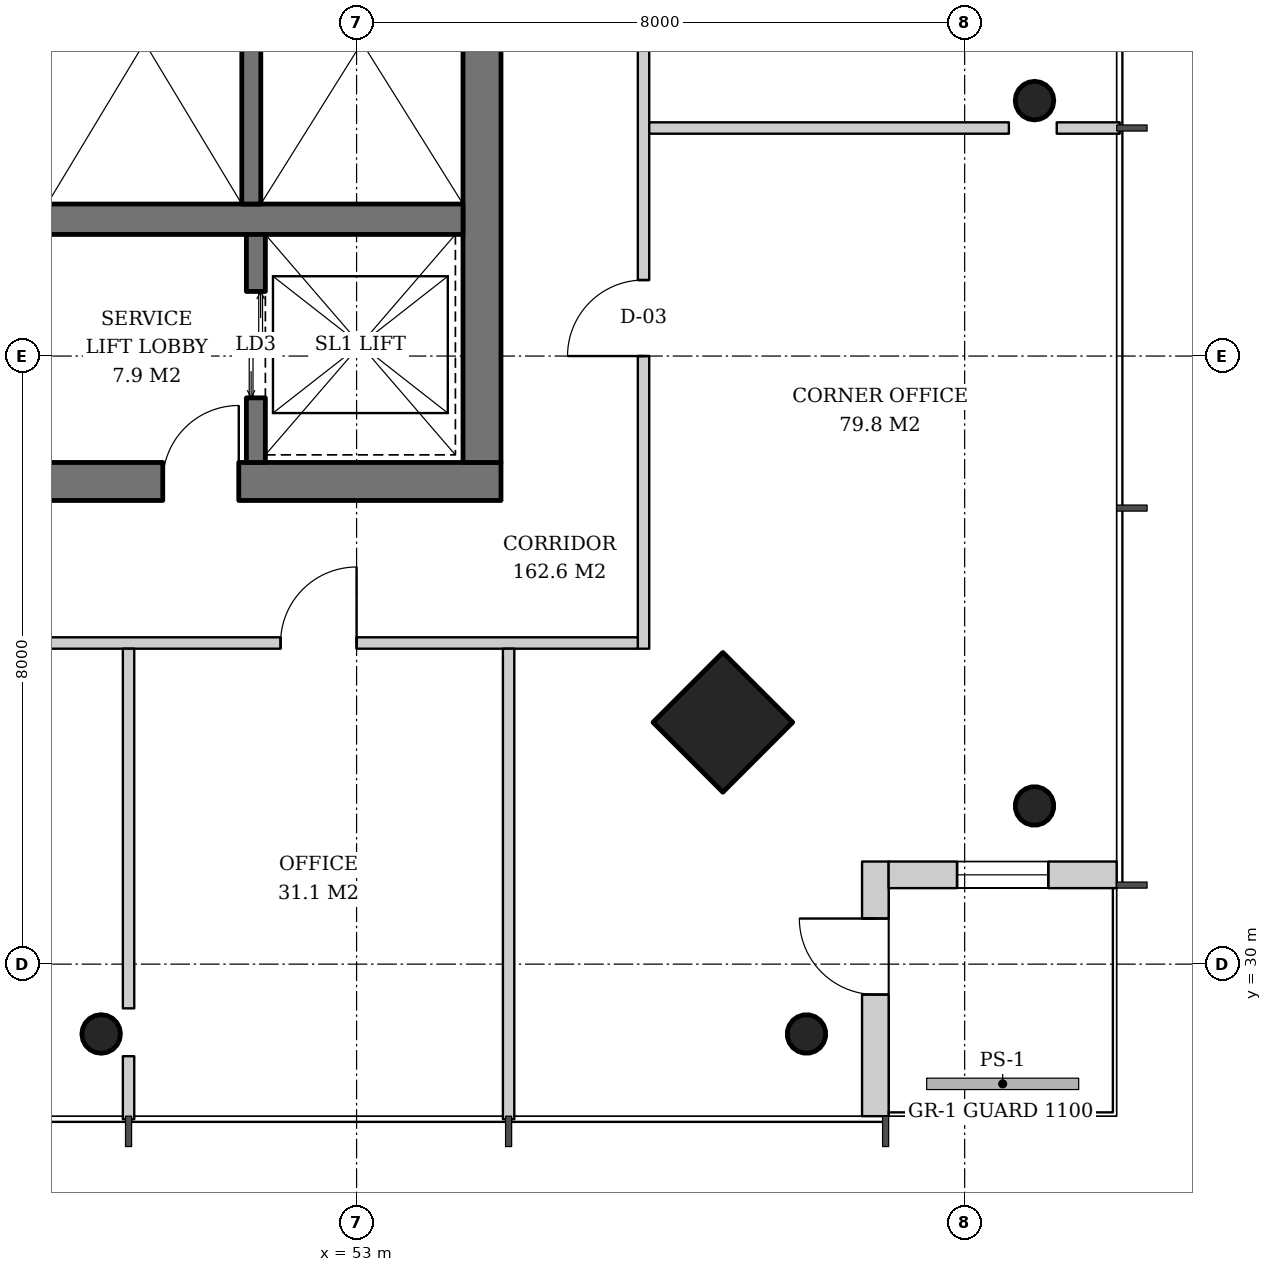
"""IFC4 building model, lengths in metres.
Left out: names, types, materials, properties, quantities, classifications, styles, units other than length and angle.
Written with IfcOpenShell. Run it as: python <this file> out.ifc"""

import sys

from ifc_helpers import new_model, si_unit, direction, frame, frame_2d, origin, origin_2d, place, context, subcontext, project, spatial, rectangle, hollow_circle, extrude, element, fill, save


model = new_model("IFC4")
c1 = context("Model", 3, precision=1e-05, world=origin(), true_north=direction((0.0, 1.0)))
c2 = subcontext(c1, "Body", "Model", "MODEL_VIEW")
j1 = project(units=[si_unit("LENGTHUNIT", "METRE"), si_unit("PLANEANGLEUNIT", "RADIAN")], contexts=[c1])
p1 = place(None, origin())
s1 = spatial("IfcSite", under=j1, at=p1, CompositionType="ELEMENT")
p2 = place(p1, origin())
s2 = spatial("IfcBuilding", under=s1, at=p2, CompositionType="ELEMENT")
p3 = place(p2, frame((0.0, 0.0, 241.4)))
s3 = spatial("IfcBuildingStorey", under=s2, at=p3, CompositionType="ELEMENT", Elevation=241.4)
p4 = place(p3, frame((61.957, 32.043, 0.0), z_axis=(-0.031898107953, 0.031898107953, 0.998981992539), x_axis=(-0.707106781187, -0.707106781187, 0.0)))
e1 = element("IfcColumn", 1, at=p4, inside=s3, PredefinedType="COLUMN", context=c2, shape_type="SweptSolid", body=[
    extrude(hollow_circle(Radius=0.254, WallThickness=0.02, at=origin_2d()), origin(), (0.0, 0.0, 1.0), 3.804),
])
p5 = place(p3, frame((61.957, 41.348, 0.0), z_axis=(-0.031912535354, 0.010658915229, 0.999433828532), x_axis=(-0.316800238982, -0.948492281772, 0.0)))
e2 = element("IfcColumn", 2, at=p5, inside=s3, PredefinedType="COLUMN", context=c2, shape_type="SweptSolid", body=[
    extrude(hollow_circle(Radius=0.254, WallThickness=0.02, at=origin_2d()), origin(), (0.0, 0.0, 1.0), 3.802),
])
p6 = place(p3, frame((57.857, 33.143, 0.0), z_axis=(-0.031962158256, 0.031962158256, 0.998977898093), x_axis=(-0.707106781187, -0.707106781187, 0.0)))
e3 = element("IfcColumn", 3, at=p6, inside=s3, PredefinedType="COLUMN", context=c2, shape_type="SweptSolid", body=[
    extrude(rectangle(XDim=1.3, YDim=1.3, at=origin_2d()), origin(), (0.0, 0.0, 1.0), 3.804),
])
p7 = place(p3, frame((58.957, 29.043, 0.0), z_axis=(-0.031898107953, 0.031898107953, 0.998981992539), x_axis=(-0.707106781187, -0.707106781187, 0.0)))
e4 = element("IfcColumn", 4, at=p7, inside=s3, PredefinedType="COLUMN", context=c2, shape_type="SweptSolid", body=[
    extrude(hollow_circle(Radius=0.254, WallThickness=0.02, at=origin_2d()), origin(), (0.0, 0.0, 1.0), 3.804),
])
p8 = place(p3, frame((49.652, 29.043, 0.0), z_axis=(-0.010658915229, 0.031912535354, 0.999433828532), x_axis=(-0.948492281772, -0.316800238982, 0.0)))
e5 = element("IfcColumn", 5, at=p8, inside=s3, PredefinedType="COLUMN", context=c2, shape_type="SweptSolid", body=[
    extrude(hollow_circle(Radius=0.254, WallThickness=0.02, at=origin_2d()), origin(), (0.0, 0.0, 1.0), 3.802),
])
p9 = place(p3, frame((35.1, 36.35, 0.0), z_axis=(0.0, 0.0, 1.0), x_axis=(1.0, 0.0, 0.0)))
e6 = element("IfcWall", 6, at=p9, inside=s3, PredefinedType="SHEAR", context=c2, shape_type="SweptSolid", body=[
    extrude(rectangle(XDim=19.8, YDim=0.5, at=frame_2d((9.9, 0.0))), origin(), (0.0, 0.0, 1.0), 3.8),
])
p10 = place(p9, frame((3.9, 0.0, 0.0)))
e7 = element("IfcOpeningElement", 7, at=p10, cuts=e6, PredefinedType="OPENING", context=c2, shape_type="SweptSolid", body=[
    extrude(rectangle(XDim=1.0, YDim=2.1, at=frame_2d((0.5, 1.05))), frame((0.0, 0.26, 0.0), z_axis=(0.0, -1.0, 0.0), x_axis=(1.0, 0.0, 0.0)), (0.0, 0.0, 1.0), 0.52),
])
p11 = place(p9, frame((15.35, 0.0, 0.0)))
e8 = element("IfcOpeningElement", 8, at=p11, cuts=e6, PredefinedType="OPENING", context=c2, shape_type="SweptSolid", body=[
    extrude(rectangle(XDim=1.0, YDim=2.1, at=frame_2d((0.5, 1.05))), frame((0.0, 0.26, 0.0), z_axis=(0.0, -1.0, 0.0), x_axis=(1.0, 0.0, 0.0)), (0.0, 0.0, 1.0), 0.52),
])
p12 = place(p3, frame((54.65, 36.6, 0.0), z_axis=(0.0, 0.0, 1.0), x_axis=(0.0, 1.0, 0.0)))
e9 = element("IfcWall", 9, at=p12, inside=s3, PredefinedType="SHEAR", context=c2, shape_type="SweptSolid", body=[
    extrude(rectangle(XDim=18.8, YDim=0.5, at=frame_2d((9.4, 0.0))), origin(), (0.0, 0.0, 1.0), 3.8),
])
p13 = place(p12, frame((8.5, 0.0, 0.0)))
e10 = element("IfcOpeningElement", 10, at=p13, cuts=e9, PredefinedType="OPENING", context=c2, shape_type="SweptSolid", body=[
    extrude(rectangle(XDim=1.8, YDim=2.4, at=frame_2d((0.9, 1.2))), frame((0.0, 0.26, 0.0), z_axis=(0.0, -1.0, 0.0), x_axis=(1.0, 0.0, 0.0)), (0.0, 0.0, 1.0), 0.52),
])
p14 = place(p3, frame((35.6, 39.8, 0.0), z_axis=(0.0, 0.0, 1.0), x_axis=(1.0, 0.0, 0.0)))
e11 = element("IfcWall", 11, at=p14, inside=s3, PredefinedType="SHEAR", context=c2, shape_type="SweptSolid", body=[
    extrude(rectangle(XDim=18.8, YDim=0.4, at=frame_2d((9.4, 0.0))), origin(), (0.0, 0.0, 1.0), 3.8),
])
p15 = place(p3, frame((59.825, 28.0, 0.0), z_axis=(0.0, 0.0, 1.0), x_axis=(0.0, 1.0, 0.0)))
e12 = element("IfcWall", 12, at=p15, inside=s3, PredefinedType="SOLIDWALL", context=c2, shape_type="SweptSolid", body=[
    extrude(rectangle(XDim=3.35, YDim=0.35, at=frame_2d((1.675, 0.0))), origin(), (0.0, 0.0, 1.0), 3.62),
])
p16 = place(p15, frame((1.6, 0.0, 0.0)))
e13 = element("IfcOpeningElement", 13, at=p16, cuts=e12, PredefinedType="OPENING", context=c2, shape_type="SweptSolid", body=[
    extrude(rectangle(XDim=1.0, YDim=2.4, at=frame_2d((0.5, 1.2))), frame((0.0, 0.185, 0.0), z_axis=(0.0, -1.0, 0.0), x_axis=(1.0, 0.0, 0.0)), (0.0, 0.0, 1.0), 0.37),
])
p17 = place(p3, frame((60.0, 31.175, 0.0), z_axis=(0.0, 0.0, 1.0), x_axis=(1.0, 0.0, 0.0)))
e14 = element("IfcWall", 14, at=p17, inside=s3, PredefinedType="SOLIDWALL", context=c2, shape_type="SweptSolid", body=[
    extrude(rectangle(XDim=3.0, YDim=0.35, at=frame_2d((1.5, 0.0))), origin(), (0.0, 0.0, 1.0), 3.62),
])
p18 = place(p17, frame((0.9, 0.0, 0.6)))
e15 = element("IfcOpeningElement", 15, at=p18, cuts=e14, PredefinedType="OPENING", context=c2, shape_type="SweptSolid", body=[
    extrude(rectangle(XDim=1.2, YDim=2.55, at=frame_2d((0.6, 1.275))), frame((0.0, 0.185, 0.0), z_axis=(0.0, -1.0, 0.0), x_axis=(1.0, 0.0, 0.0)), (0.0, 0.0, 1.0), 0.37),
])
p19 = place(p3, frame((51.675, 36.6, 0.0), z_axis=(0.0, 0.0, 1.0), x_axis=(0.0, 1.0, 0.0)))
e16 = element("IfcWall", 16, at=p19, inside=s3, PredefinedType="SHEAR", context=c2, shape_type="SweptSolid", body=[
    extrude(rectangle(XDim=3.0, YDim=0.25, at=frame_2d((1.5, 0.0))), origin(), (0.0, 0.0, 1.0), 3.8),
])
p20 = place(p19, frame((0.85, 0.0, 0.0)))
e17 = element("IfcOpeningElement", 17, at=p20, cuts=e16, PredefinedType="OPENING", context=c2, shape_type="SweptSolid", body=[
    extrude(rectangle(XDim=1.4, YDim=2.4, at=frame_2d((0.7, 1.2))), frame((0.0, 0.135, 0.0), z_axis=(0.0, -1.0, 0.0), x_axis=(1.0, 0.0, 0.0)), (0.0, 0.0, 1.0), 0.27),
])
p21 = place(p3, frame((51.615, 44.25, 0.0), z_axis=(0.0, 0.0, 1.0), x_axis=(0.0, -1.0, 0.0)))
e18 = element("IfcWall", 18, at=p21, inside=s3, PredefinedType="SHEAR", context=c2, shape_type="SweptSolid", body=[
    extrude(rectangle(XDim=4.25, YDim=0.25, at=frame_2d((2.125, 0.0))), origin(), (0.0, 0.0, 1.0), 3.8),
])
p22 = place(p3, frame((56.775, 34.15, 0.0), z_axis=(0.0, 0.0, 1.0), x_axis=(0.0, 1.0, 0.0)))
e19 = element("IfcWall", 19, at=p22, inside=s3, PredefinedType="PARTITIONING", context=c2, shape_type="SweptSolid", body=[
    extrude(rectangle(XDim=23.55, YDim=0.15, at=frame_2d((11.775, 0.0))), origin(), (0.0, 0.0, 1.0), 3.02),
])
p23 = place(p22, frame((3.85, 0.0, 0.0)))
e20 = element("IfcOpeningElement", 20, at=p23, cuts=e19, PredefinedType="OPENING", context=c2, shape_type="SweptSolid", body=[
    extrude(rectangle(XDim=1.0, YDim=2.1, at=frame_2d((0.5, 1.05))), frame((0.0, 0.085, 0.0), z_axis=(0.0, -1.0, 0.0), x_axis=(1.0, 0.0, 0.0)), (0.0, 0.0, 1.0), 0.17),
])
p24 = place(p22, frame((8.85, 0.0, 0.0)))
e21 = element("IfcOpeningElement", 21, at=p24, cuts=e19, PredefinedType="OPENING", context=c2, shape_type="SweptSolid", body=[
    extrude(rectangle(XDim=1.0, YDim=2.1, at=frame_2d((0.5, 1.05))), frame((0.0, 0.085, 0.0), z_axis=(0.0, -1.0, 0.0), x_axis=(1.0, 0.0, 0.0)), (0.0, 0.0, 1.0), 0.17),
])
p25 = place(p22, frame((13.85, 0.0, 0.0)))
e22 = element("IfcOpeningElement", 22, at=p25, cuts=e19, PredefinedType="OPENING", context=c2, shape_type="SweptSolid", body=[
    extrude(rectangle(XDim=1.0, YDim=2.1, at=frame_2d((0.5, 1.05))), frame((0.0, 0.085, 0.0), z_axis=(0.0, -1.0, 0.0), x_axis=(1.0, 0.0, 0.0)), (0.0, 0.0, 1.0), 0.17),
])
p26 = place(p22, frame((18.85, 0.0, 0.0)))
e23 = element("IfcOpeningElement", 23, at=p26, cuts=e19, PredefinedType="OPENING", context=c2, shape_type="SweptSolid", body=[
    extrude(rectangle(XDim=1.0, YDim=2.1, at=frame_2d((0.5, 1.05))), frame((0.0, 0.085, 0.0), z_axis=(0.0, -1.0, 0.0), x_axis=(1.0, 0.0, 0.0)), (0.0, 0.0, 1.0), 0.17),
])
p27 = place(p3, frame((56.85, 41.0, 0.0), z_axis=(0.0, 0.0, 1.0), x_axis=(1.0, 0.0, 0.0)))
e24 = element("IfcWall", 24, at=p27, inside=s3, PredefinedType="PARTITIONING", context=c2, shape_type="SweptSolid", body=[
    extrude(rectangle(XDim=4.732, YDim=0.15, at=frame_2d((2.366, 0.0))), origin(), (0.0, 0.0, 1.0), 3.62),
])
p28 = place(p3, frame((62.211, 41.0, 0.0), z_axis=(0.0, 0.0, 1.0), x_axis=(1.0, 0.0, 0.0)))
e25 = element("IfcWall", 25, at=p28, inside=s3, PredefinedType="PARTITIONING", context=c2, shape_type="SweptSolid", body=[
    extrude(rectangle(XDim=0.829, YDim=0.15, at=frame_2d((0.415, 0.0))), origin(), (0.0, 0.0, 1.0), 3.62),
])
p29 = place(p3, frame((33.15, 34.225, 0.0), z_axis=(0.0, 0.0, 1.0), x_axis=(1.0, 0.0, 0.0)))
e26 = element("IfcWall", 26, at=p29, inside=s3, PredefinedType="PARTITIONING", context=c2, shape_type="SweptSolid", body=[
    extrude(rectangle(XDim=23.55, YDim=0.15, at=frame_2d((11.775, 0.0))), origin(), (0.0, 0.0, 1.0), 3.02),
])
p30 = place(p29, frame((3.85, 0.0, 0.0)))
e27 = element("IfcOpeningElement", 27, at=p30, cuts=e26, PredefinedType="OPENING", context=c2, shape_type="SweptSolid", body=[
    extrude(rectangle(XDim=1.0, YDim=2.1, at=frame_2d((0.5, 1.05))), frame((0.0, 0.085, 0.0), z_axis=(0.0, -1.0, 0.0), x_axis=(1.0, 0.0, 0.0)), (0.0, 0.0, 1.0), 0.17),
])
p31 = place(p29, frame((8.85, 0.0, 0.0)))
e28 = element("IfcOpeningElement", 28, at=p31, cuts=e26, PredefinedType="OPENING", context=c2, shape_type="SweptSolid", body=[
    extrude(rectangle(XDim=1.0, YDim=2.1, at=frame_2d((0.5, 1.05))), frame((0.0, 0.085, 0.0), z_axis=(0.0, -1.0, 0.0), x_axis=(1.0, 0.0, 0.0)), (0.0, 0.0, 1.0), 0.17),
])
p32 = place(p29, frame((18.85, 0.0, 0.0)))
e29 = element("IfcOpeningElement", 29, at=p32, cuts=e26, PredefinedType="OPENING", context=c2, shape_type="SweptSolid", body=[
    extrude(rectangle(XDim=1.0, YDim=2.1, at=frame_2d((0.5, 1.05))), frame((0.0, 0.085, 0.0), z_axis=(0.0, -1.0, 0.0), x_axis=(1.0, 0.0, 0.0)), (0.0, 0.0, 1.0), 0.17),
])
p33 = place(p3, frame((50.0, 34.15, 0.0), z_axis=(0.0, 0.0, 1.0), x_axis=(0.0, -1.0, 0.0)))
e30 = element("IfcWall", 30, at=p33, inside=s3, PredefinedType="PARTITIONING", context=c2, shape_type="SweptSolid", body=[
    extrude(rectangle(XDim=4.732, YDim=0.15, at=frame_2d((2.366, 0.0))), origin(), (0.0, 0.0, 1.0), 3.62),
])
p34 = place(p3, frame((50.0, 28.789, 0.0), z_axis=(0.0, 0.0, 1.0), x_axis=(0.0, -1.0, 0.0)))
e31 = element("IfcWall", 31, at=p34, inside=s3, PredefinedType="PARTITIONING", context=c2, shape_type="SweptSolid", body=[
    extrude(rectangle(XDim=0.829, YDim=0.15, at=frame_2d((0.415, 0.0))), origin(), (0.0, 0.0, 1.0), 3.62),
])
p35 = place(p3, frame((55.0, 34.15, 0.0), z_axis=(0.0, 0.0, 1.0), x_axis=(0.0, -1.0, 0.0)))
e32 = element("IfcWall", 32, at=p35, inside=s3, PredefinedType="PARTITIONING", context=c2, shape_type="SweptSolid", body=[
    extrude(rectangle(XDim=6.19, YDim=0.15, at=frame_2d((3.095, 0.0))), origin(), (0.0, 0.0, 1.0), 3.12),
])
p36 = place(p16, origin())
e33 = element("IfcDoor", 33, at=p36, inside=s3, OperationType="SINGLE_SWING_RIGHT", PredefinedType="DOOR", context=c2, shape_type="SweptSolid", body=[
    extrude(rectangle(XDim=1.0, YDim=2.4, at=frame_2d((0.5, 1.2))), frame((0.0, 0.025, 0.0), z_axis=(0.0, -1.0, 0.0), x_axis=(1.0, 0.0, 0.0)), (0.0, 0.0, 1.0), 0.05),
])
fill(e13, e33)
p37 = place(p18, origin())
e34 = element("IfcWindow", 34, at=p37, inside=s3, PartitioningType="SINGLE_PANEL", PredefinedType="WINDOW", context=c2, shape_type="SweptSolid", body=[
    extrude(rectangle(XDim=1.2, YDim=2.55, at=frame_2d((0.6, 1.275))), frame((0.0, 0.03, 0.0), z_axis=(0.0, -1.0, 0.0), x_axis=(1.0, 0.0, 0.0)), (0.0, 0.0, 1.0), 0.06),
])
fill(e15, e34)
p38 = place(p20, origin())
e35 = element("IfcDoor", 35, at=p38, inside=s3, OperationType="DOUBLE_DOOR_SLIDING", PredefinedType="DOOR", context=c2, shape_type="SweptSolid", body=[
    extrude(rectangle(XDim=1.4, YDim=2.4, at=frame_2d((0.7, 1.2))), frame((0.0, 0.025, 0.0), z_axis=(0.0, -1.0, 0.0), x_axis=(1.0, 0.0, 0.0)), (0.0, 0.0, 1.0), 0.05),
])
fill(e17, e35)
p39 = place(p11, origin())
e36 = element("IfcDoor", 36, at=p39, inside=s3, OperationType="SINGLE_SWING_RIGHT", PredefinedType="DOOR", context=c2, shape_type="SweptSolid", body=[
    extrude(rectangle(XDim=1.0, YDim=2.1, at=frame_2d((0.5, 1.05))), frame((0.0, 0.025, 0.0), z_axis=(0.0, -1.0, 0.0), x_axis=(1.0, 0.0, 0.0)), (0.0, 0.0, 1.0), 0.05),
])
fill(e8, e36)
p40 = place(p23, origin())
e37 = element("IfcDoor", 37, at=p40, inside=s3, OperationType="SINGLE_SWING_LEFT", PredefinedType="DOOR", context=c2, shape_type="SweptSolid", body=[
    extrude(rectangle(XDim=1.0, YDim=2.1, at=frame_2d((0.5, 1.05))), frame((0.0, 0.025, 0.0), z_axis=(0.0, -1.0, 0.0), x_axis=(1.0, 0.0, 0.0)), (0.0, 0.0, 1.0), 0.05),
])
fill(e20, e37)
p41 = place(p32, origin())
e38 = element("IfcDoor", 38, at=p41, inside=s3, OperationType="SINGLE_SWING_RIGHT", PredefinedType="DOOR", context=c2, shape_type="SweptSolid", body=[
    extrude(rectangle(XDim=1.0, YDim=2.1, at=frame_2d((0.5, 1.05))), frame((0.0, 0.025, 0.0), z_axis=(0.0, -1.0, 0.0), x_axis=(1.0, 0.0, 0.0)), (0.0, 0.0, 1.0), 0.05),
])
fill(e29, e38)
save(model, sys.argv[1])
